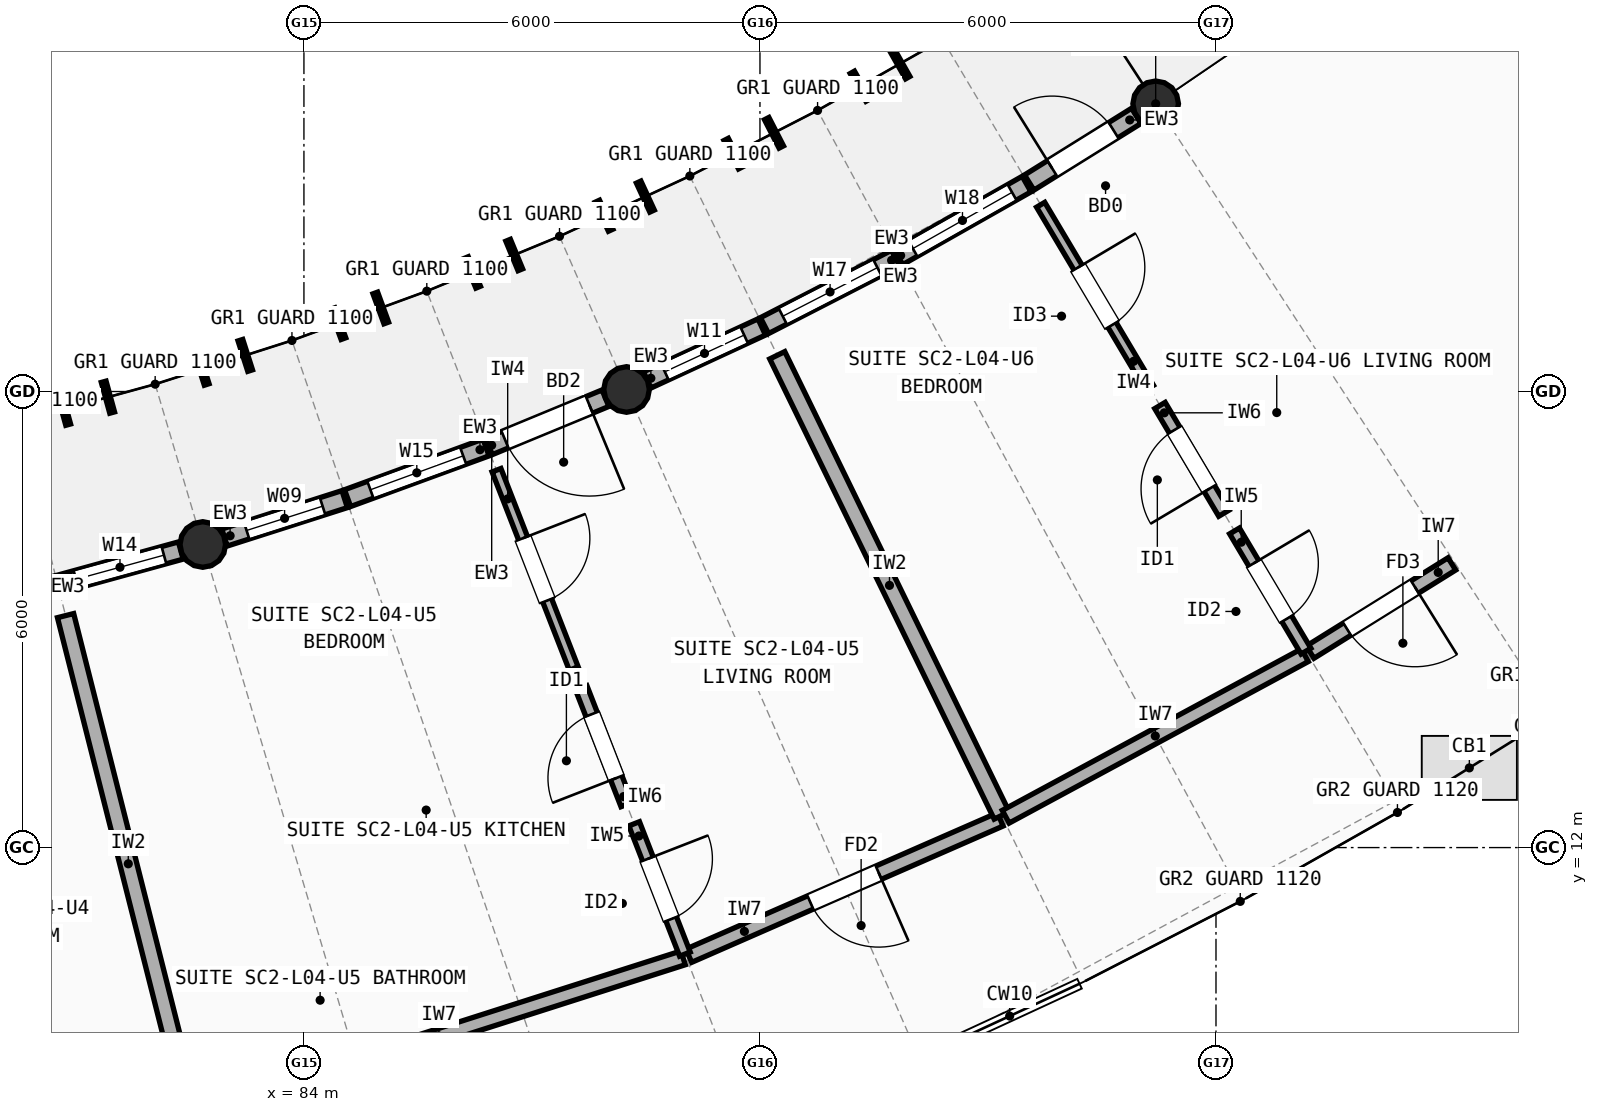
"""IFC4 building model, lengths in metres.
Left out: names, types, materials, properties, quantities, classifications, styles, units other than length and angle.
Written with IfcOpenShell. Run it as: python <this file> out.ifc"""

import sys

from ifc_helpers import new_model, si_unit, direction, frame, frame_2d, origin, origin_2d, place, context, subcontext, project, spatial, rectangle, circle, extrude, element, fill, save


model = new_model("IFC4")
c1 = context("Model", 3, precision=1e-05, world=origin(), true_north=direction((0.0, 1.0)))
c2 = subcontext(c1, "Body", "Model", "MODEL_VIEW")
j1 = project(units=[si_unit("LENGTHUNIT", "METRE"), si_unit("PLANEANGLEUNIT", "RADIAN")], contexts=[c1])
p1 = place(None, origin())
s1 = spatial("IfcSite", under=j1, at=p1, CompositionType="ELEMENT")
p2 = place(p1, origin())
s2 = spatial("IfcBuilding", under=s1, at=p2, CompositionType="ELEMENT")
p3 = place(p2, frame((0.0, 0.0, 14.1)))
s3 = spatial("IfcBuildingStorey", under=s2, at=p3, CompositionType="ELEMENT", Elevation=14.1)
for number, where, z_axis, x_axis in (
    (1, (82.669, 15.988, 0.0), (0.0, 0.0, 1.0), (1.0, 0.0, 0.0)),
    (2, (88.245, 18.027, 0.0), (0.0, 0.0, 1.0), (1.0, 0.0, 0.0)),
    (3, (95.207, 21.785, 0.0), (0.0, 0.0, 1.0), (1.0, 0.0, 0.0)),
):
    element("IfcColumn", number, at=place(p3, frame(where, z_axis=z_axis, x_axis=x_axis)), inside=s3, PredefinedType="COLUMN", context=c2, shape_type="SweptSolid", body=[
        extrude(circle(Radius=0.3, at=origin_2d()), origin(), (0.0, 0.0, 1.0), 2.948),
    ])
p4 = place(p3, frame((78.85, 15.022, 0.0), z_axis=(0.0, 0.0, 1.0), x_axis=(0.974359373104, 0.224997360081, 0.0)))
e4 = element("IfcWall", 4, at=p4, inside=s3, PredefinedType="STANDARD", context=c2, shape_type="SweptSolid", body=[
    extrude(rectangle(XDim=1.94, YDim=0.235, at=frame_2d((0.97, 0.0))), origin(), (0.0, 0.0, 1.0), 2.684),
])
p5 = place(p4, frame((0.42, 0.0, 0.0)))
e5 = element("IfcOpeningElement", 5, at=p5, cuts=e4, PredefinedType="OPENING", context=c2, shape_type="SweptSolid", body=[
    extrude(rectangle(XDim=1.1, YDim=2.15, at=frame_2d((0.55, 1.075))), frame((0.0, 0.127, 0.0), z_axis=(0.0, -1.0, 0.0), x_axis=(1.0, 0.0, 0.0)), (0.0, 0.0, 1.0), 0.255),
])
p6 = place(p3, frame((80.779, 15.468, 0.0), z_axis=(0.0, 0.0, 1.0), x_axis=(0.964276805489, 0.264896663619, 0.0)))
e6 = element("IfcWall", 6, at=p6, inside=s3, PredefinedType="STANDARD", context=c2, shape_type="SweptSolid", body=[
    extrude(rectangle(XDim=1.66, YDim=0.235, at=frame_2d((0.83, 0.0))), origin(), (0.0, 0.0, 1.0), 2.684),
])
p7 = place(p6, frame((0.23, 0.0, 0.85)))
e7 = element("IfcOpeningElement", 7, at=p7, cuts=e6, PredefinedType="OPENING", context=c2, shape_type="SweptSolid", body=[
    extrude(rectangle(XDim=1.2, YDim=1.5, at=frame_2d((0.6, 0.75))), frame((0.0, 0.127, 0.0), z_axis=(0.0, -1.0, 0.0), x_axis=(1.0, 0.0, 0.0)), (0.0, 0.0, 1.0), 0.255),
])
p8 = place(p3, frame((82.955, 16.079, 0.0), z_axis=(0.0, 0.0, 1.0), x_axis=(0.952523149859, 0.304466170508, 0.0)))
e8 = element("IfcWall", 8, at=p8, inside=s3, PredefinedType="STANDARD", context=c2, shape_type="SweptSolid", body=[
    extrude(rectangle(XDim=1.66, YDim=0.235, at=frame_2d((0.83, 0.0))), origin(), (0.0, 0.0, 1.0), 2.684),
])
p9 = place(p8, frame((0.305, 0.0, 0.85)))
e9 = element("IfcOpeningElement", 9, at=p9, cuts=e8, PredefinedType="OPENING", context=c2, shape_type="SweptSolid", body=[
    extrude(rectangle(XDim=1.05, YDim=1.35, at=frame_2d((0.525, 0.675))), frame((0.0, 0.127, 0.0), z_axis=(0.0, -1.0, 0.0), x_axis=(1.0, 0.0, 0.0)), (0.0, 0.0, 1.0), 0.255),
])
p10 = place(p3, frame((84.574, 16.597, 0.0), z_axis=(0.0, 0.0, 1.0), x_axis=(0.939178301307, 0.343429932235, 0.0)))
e10 = element("IfcWall", 10, at=p10, inside=s3, PredefinedType="STANDARD", context=c2, shape_type="SweptSolid", body=[
    extrude(rectangle(XDim=1.94, YDim=0.235, at=frame_2d((0.97, 0.0))), origin(), (0.0, 0.0, 1.0), 2.684),
])
p11 = place(p10, frame((0.32, 0.0, 0.85)))
e11 = element("IfcOpeningElement", 11, at=p11, cuts=e10, PredefinedType="OPENING", context=c2, shape_type="SweptSolid", body=[
    extrude(rectangle(XDim=1.3, YDim=1.45, at=frame_2d((0.65, 0.725))), frame((0.0, 0.127, 0.0), z_axis=(0.0, -1.0, 0.0), x_axis=(1.0, 0.0, 0.0)), (0.0, 0.0, 1.0), 0.255),
])
p12 = place(p3, frame((86.433, 17.278, 0.0), z_axis=(0.0, 0.0, 1.0), x_axis=(0.924165494985, 0.38199232699, 0.0)))
e12 = element("IfcWall", 12, at=p12, inside=s3, PredefinedType="STANDARD", context=c2, shape_type="SweptSolid", body=[
    extrude(rectangle(XDim=1.66, YDim=0.235, at=frame_2d((0.83, 0.0))), origin(), (0.0, 0.0, 1.0), 2.684),
])
p13 = place(p12, frame((0.23, 0.0, 0.0)))
e13 = element("IfcOpeningElement", 13, at=p13, cuts=e12, PredefinedType="OPENING", context=c2, shape_type="SweptSolid", body=[
    extrude(rectangle(XDim=1.2, YDim=2.15, at=frame_2d((0.6, 1.075))), frame((0.0, 0.127, 0.0), z_axis=(0.0, -1.0, 0.0), x_axis=(1.0, 0.0, 0.0)), (0.0, 0.0, 1.0), 0.255),
])
p14 = place(p3, frame((88.517, 18.153, 0.0), z_axis=(0.0, 0.0, 1.0), x_axis=(0.907575902742, 0.419888057418, 0.0)))
e14 = element("IfcWall", 14, at=p14, inside=s3, PredefinedType="STANDARD", context=c2, shape_type="SweptSolid", body=[
    extrude(rectangle(XDim=1.66, YDim=0.235, at=frame_2d((0.83, 0.0))), origin(), (0.0, 0.0, 1.0), 2.684),
])
p15 = place(p14, frame((0.255, 0.0, 0.85)))
e15 = element("IfcOpeningElement", 15, at=p15, cuts=e14, PredefinedType="OPENING", context=c2, shape_type="SweptSolid", body=[
    extrude(rectangle(XDim=1.15, YDim=1.45, at=frame_2d((0.575, 0.725))), frame((0.0, 0.127, 0.0), z_axis=(0.0, -1.0, 0.0), x_axis=(1.0, 0.0, 0.0)), (0.0, 0.0, 1.0), 0.255),
])
p16 = place(p3, frame((90.06, 18.867, 0.0), z_axis=(0.0, 0.0, 1.0), x_axis=(0.889517261343, 0.456901566832, 0.0)))
e16 = element("IfcWall", 16, at=p16, inside=s3, PredefinedType="STANDARD", context=c2, shape_type="SweptSolid", body=[
    extrude(rectangle(XDim=1.94, YDim=0.235, at=frame_2d((0.97, 0.0))), origin(), (0.0, 0.0, 1.0), 2.684),
])
p17 = place(p16, frame((0.27, 0.0, 0.85)))
e17 = element("IfcOpeningElement", 17, at=p17, cuts=e16, PredefinedType="OPENING", context=c2, shape_type="SweptSolid", body=[
    extrude(rectangle(XDim=1.4, YDim=1.5, at=frame_2d((0.7, 0.75))), frame((0.0, 0.127, 0.0), z_axis=(0.0, -1.0, 0.0), x_axis=(1.0, 0.0, 0.0)), (0.0, 0.0, 1.0), 0.255),
])
p18 = place(p3, frame((91.821, 19.772, 0.0), z_axis=(0.0, 0.0, 1.0), x_axis=(0.86993400964, 0.493168144623, 0.0)))
e18 = element("IfcWall", 18, at=p18, inside=s3, PredefinedType="STANDARD", context=c2, shape_type="SweptSolid", body=[
    extrude(rectangle(XDim=1.94, YDim=0.235, at=frame_2d((0.97, 0.0))), origin(), (0.0, 0.0, 1.0), 2.684),
])
p19 = place(p18, frame((0.22, 0.0, 0.85)))
e19 = element("IfcOpeningElement", 19, at=p19, cuts=e18, PredefinedType="OPENING", context=c2, shape_type="SweptSolid", body=[
    extrude(rectangle(XDim=1.5, YDim=1.4, at=frame_2d((0.75, 0.7))), frame((0.0, 0.127, 0.0), z_axis=(0.0, -1.0, 0.0), x_axis=(1.0, 0.0, 0.0)), (0.0, 0.0, 1.0), 0.255),
])
p20 = place(p3, frame((93.543, 20.75, 0.0), z_axis=(0.0, 0.0, 1.0), x_axis=(0.848955427013, 0.528464457598, 0.0)))
e20 = element("IfcWall", 20, at=p20, inside=s3, PredefinedType="STANDARD", context=c2, shape_type="SweptSolid", body=[
    extrude(rectangle(XDim=1.66, YDim=0.235, at=frame_2d((0.83, 0.0))), origin(), (0.0, 0.0, 1.0), 2.684),
])
p21 = place(p20, frame((0.355, 0.0, 0.0)))
e21 = element("IfcOpeningElement", 21, at=p21, cuts=e20, PredefinedType="OPENING", context=c2, shape_type="SweptSolid", body=[
    extrude(rectangle(XDim=0.95, YDim=2.12, at=frame_2d((0.475, 1.06))), frame((0.0, 0.127, 0.0), z_axis=(0.0, -1.0, 0.0), x_axis=(1.0, 0.0, 0.0)), (0.0, 0.0, 1.0), 0.255),
])
p22 = place(p3, frame((80.864, 15.052, 0.0), z_axis=(0.0, 0.0, 1.0), x_axis=(0.244982481903, -0.969527505314, 0.0)))
e22 = element("IfcWall", 22, at=p22, inside=s3, PredefinedType="SOLIDWALL", context=c2, shape_type="SweptSolid", body=[
    extrude(rectangle(XDim=6.736, YDim=0.22, at=frame_2d((3.368, 0.0))), origin(), (0.0, 0.0, 1.0), 2.762),
])
p23 = place(p3, frame((82.562, 8.495, 0.0), z_axis=(0.0, 0.0, 1.0), x_axis=(0.952529122406, 0.304447484746, 0.0)))
e23 = element("IfcWall", 23, at=p23, inside=s3, PredefinedType="SOLIDWALL", context=c2, shape_type="SweptSolid", body=[
    extrude(rectangle(XDim=6.747, YDim=0.19, at=frame_2d((3.374, 0.0))), origin(), (0.0, 0.0, 1.0), 2.722),
])
p24 = place(p3, frame((89.064, 10.577, 0.0), z_axis=(0.0, 0.0, 1.0), x_axis=(0.91610596958, 0.40093621999, 0.0)))
e24 = element("IfcWall", 24, at=p24, inside=s3, PredefinedType="SOLIDWALL", context=c2, shape_type="SweptSolid", body=[
    extrude(rectangle(XDim=4.473, YDim=0.19, at=frame_2d((2.237, 0.0))), origin(), (0.0, 0.0, 1.0), 2.722),
])
p25 = place(p24, frame((1.747, 0.0, 0.0)))
e25 = element("IfcOpeningElement", 25, at=p25, cuts=e24, PredefinedType="OPENING", context=c2, shape_type="SweptSolid", body=[
    extrude(rectangle(XDim=0.98, YDim=2.15, at=frame_2d((0.49, 1.075))), frame((0.0, 0.105, 0.0), z_axis=(0.0, -1.0, 0.0), x_axis=(1.0, 0.0, 0.0)), (0.0, 0.0, 1.0), 0.21),
])
p26 = place(p3, frame((86.534, 16.965, 0.0), z_axis=(0.0, 0.0, 1.0), x_axis=(0.362896442288, -0.93182947591, 0.0)))
e26 = element("IfcWall", 26, at=p26, inside=s3, PredefinedType="PARTITIONING", context=c2, shape_type="SweptSolid", body=[
    extrude(rectangle(XDim=2.8, YDim=0.125, at=frame_2d((1.4, 0.0))), origin(), (0.0, 0.0, 1.0), 2.762),
])
p27 = place(p26, frame((0.96, 0.0, 0.0)))
e27 = element("IfcOpeningElement", 27, at=p27, cuts=e26, PredefinedType="OPENING", context=c2, shape_type="SweptSolid", body=[
    extrude(rectangle(XDim=0.88, YDim=2.1, at=frame_2d((0.44, 1.05))), frame((0.0, 0.073, 0.0), z_axis=(0.0, -1.0, 0.0), x_axis=(1.0, 0.0, 0.0)), (0.0, 0.0, 1.0), 0.145),
])
p28 = place(p3, frame((87.648, 14.102, 0.0), z_axis=(0.0, 0.0, 1.0), x_axis=(0.362817996081, -0.9318600226, 0.0)))
e28 = element("IfcWall", 28, at=p28, inside=s3, PredefinedType="PLUMBINGWALL", context=c2, shape_type="SweptSolid", body=[
    extrude(rectangle(XDim=1.648, YDim=0.16, at=frame_2d((0.824, 0.0))), origin(), (0.0, 0.0, 1.0), 2.762),
])
p29 = place(p28, frame((0.374, 0.0, 0.0)))
e29 = element("IfcOpeningElement", 29, at=p29, cuts=e28, PredefinedType="OPENING", context=c2, shape_type="SweptSolid", body=[
    extrude(rectangle(XDim=0.9, YDim=2.1, at=frame_2d((0.45, 1.05))), frame((0.0, 0.09, 0.0), z_axis=(0.0, -1.0, 0.0), x_axis=(1.0, 0.0, 0.0)), (0.0, 0.0, 1.0), 0.18),
])
p30 = place(p3, frame((88.345, 12.313, 0.0), z_axis=(0.0, 0.0, 1.0), x_axis=(0.362772804225, -0.931877616705, 0.0)))
e30 = element("IfcWall", 30, at=p30, inside=s3, PredefinedType="PARTITIONING", context=c2, shape_type="SweptSolid", body=[
    extrude(rectangle(XDim=1.84, YDim=0.15, at=frame_2d((0.92, 0.0))), origin(), (0.0, 0.0, 1.0), 2.762),
])
p31 = place(p30, frame((0.495, 0.0, 0.0)))
e31 = element("IfcOpeningElement", 31, at=p31, cuts=e30, PredefinedType="OPENING", context=c2, shape_type="SweptSolid", body=[
    extrude(rectangle(XDim=0.85, YDim=2.1, at=frame_2d((0.425, 1.05))), frame((0.0, 0.085, 0.0), z_axis=(0.0, -1.0, 0.0), x_axis=(1.0, 0.0, 0.0)), (0.0, 0.0, 1.0), 0.17),
])
p32 = place(p3, frame((90.228, 18.477, 0.0), z_axis=(0.0, 0.0, 1.0), x_axis=(0.438406494017, -0.898776805444, 0.0)))
e32 = element("IfcWall", 32, at=p32, inside=s3, PredefinedType="SOLIDWALL", context=c2, shape_type="SweptSolid", body=[
    extrude(rectangle(XDim=6.736, YDim=0.22, at=frame_2d((3.368, 0.0))), origin(), (0.0, 0.0, 1.0), 2.742),
])
p33 = place(p3, frame((93.233, 12.406, 0.0), z_axis=(0.0, 0.0, 1.0), x_axis=(0.879935975281, 0.475092285147, 0.0)))
e33 = element("IfcWall", 33, at=p33, inside=s3, PredefinedType="SOLIDWALL", context=c2, shape_type="SweptSolid", body=[
    extrude(rectangle(XDim=4.473, YDim=0.19, at=frame_2d((2.236, 0.0))), origin(), (0.0, 0.0, 1.0), 2.762),
])
p34 = place(p3, frame((97.239, 14.571, 0.0), z_axis=(0.0, 0.0, 1.0), x_axis=(0.848914783767, 0.528529743631, 0.0)))
e34 = element("IfcWall", 34, at=p34, inside=s3, PredefinedType="SOLIDWALL", context=c2, shape_type="SweptSolid", body=[
    extrude(rectangle(XDim=2.197, YDim=0.19, at=frame_2d((1.099, 0.0))), origin(), (0.0, 0.0, 1.0), 2.95),
])
p35 = place(p34, frame((0.573, 0.0, 0.0)))
e35 = element("IfcOpeningElement", 35, at=p35, cuts=e34, PredefinedType="OPENING", context=c2, shape_type="SweptSolid", body=[
    extrude(rectangle(XDim=1.05, YDim=2.15, at=frame_2d((0.525, 1.075))), frame((0.0, 0.105, 0.0), z_axis=(0.0, -1.0, 0.0), x_axis=(1.0, 0.0, 0.0)), (0.0, 0.0, 1.0), 0.21),
])
p36 = place(p3, frame((93.693, 20.457, 0.0), z_axis=(0.0, 0.0, 1.0), x_axis=(0.510939588664, -0.859616621952, 0.0)))
e36 = element("IfcWall", 36, at=p36, inside=s3, PredefinedType="PARTITIONING", context=c2, shape_type="SweptSolid", body=[
    extrude(rectangle(XDim=2.8, YDim=0.125, at=frame_2d((1.4, 0.0))), origin(), (0.0, 0.0, 1.0), 2.722),
])
p37 = place(p36, frame((0.96, 0.0, 0.0)))
e37 = element("IfcOpeningElement", 37, at=p37, cuts=e36, PredefinedType="OPENING", context=c2, shape_type="SweptSolid", body=[
    extrude(rectangle(XDim=0.88, YDim=2.1, at=frame_2d((0.44, 1.05))), frame((0.0, 0.073, 0.0), z_axis=(0.0, -1.0, 0.0), x_axis=(1.0, 0.0, 0.0)), (0.0, 0.0, 1.0), 0.145),
])
p38 = place(p3, frame((95.263, 17.816, 0.0), z_axis=(0.0, 0.0, 1.0), x_axis=(0.510918615189, -0.859629087835, 0.0)))
e38 = element("IfcWall", 38, at=p38, inside=s3, PredefinedType="PLUMBINGWALL", context=c2, shape_type="SweptSolid", body=[
    extrude(rectangle(XDim=1.648, YDim=0.16, at=frame_2d((0.824, 0.0))), origin(), (0.0, 0.0, 1.0), 2.722),
])
p39 = place(p38, frame((0.374, 0.0, 0.0)))
e39 = element("IfcOpeningElement", 39, at=p39, cuts=e38, PredefinedType="OPENING", context=c2, shape_type="SweptSolid", body=[
    extrude(rectangle(XDim=0.9, YDim=2.1, at=frame_2d((0.45, 1.05))), frame((0.0, 0.09, 0.0), z_axis=(0.0, -1.0, 0.0), x_axis=(1.0, 0.0, 0.0)), (0.0, 0.0, 1.0), 0.18),
])
p40 = place(p3, frame((96.244, 16.166, 0.0), z_axis=(0.0, 0.0, 1.0), x_axis=(0.510998553825, -0.859581571457, 0.0)))
e40 = element("IfcWall", 40, at=p40, inside=s3, PredefinedType="PARTITIONING", context=c2, shape_type="SweptSolid", body=[
    extrude(rectangle(XDim=1.84, YDim=0.15, at=frame_2d((0.92, 0.0))), origin(), (0.0, 0.0, 1.0), 2.722),
])
p41 = place(p40, frame((0.495, 0.0, 0.0)))
e41 = element("IfcOpeningElement", 41, at=p41, cuts=e40, PredefinedType="OPENING", context=c2, shape_type="SweptSolid", body=[
    extrude(rectangle(XDim=0.85, YDim=2.1, at=frame_2d((0.425, 1.05))), frame((0.0, 0.085, 0.0), z_axis=(0.0, -1.0, 0.0), x_axis=(1.0, 0.0, 0.0)), (0.0, 0.0, 1.0), 0.17),
])
p42 = place(p7, origin())
e42 = element("IfcWindow", 42, at=p42, inside=s3, PartitioningType="SINGLE_PANEL", PredefinedType="WINDOW", context=c2, shape_type="SweptSolid", body=[
    extrude(rectangle(XDim=1.2, YDim=1.5, at=frame_2d((0.6, 0.75))), frame((0.0, 0.03, 0.0), z_axis=(0.0, -1.0, 0.0), x_axis=(1.0, 0.0, 0.0)), (0.0, 0.0, 1.0), 0.06),
])
fill(e7, e42)
p43 = place(p9, origin())
e43 = element("IfcWindow", 43, at=p43, inside=s3, PartitioningType="SINGLE_PANEL", PredefinedType="WINDOW", context=c2, shape_type="SweptSolid", body=[
    extrude(rectangle(XDim=1.05, YDim=1.35, at=frame_2d((0.525, 0.675))), frame((0.0, 0.03, 0.0), z_axis=(0.0, -1.0, 0.0), x_axis=(1.0, 0.0, 0.0)), (0.0, 0.0, 1.0), 0.06),
])
fill(e9, e43)
p44 = place(p11, origin())
e44 = element("IfcWindow", 44, at=p44, inside=s3, PartitioningType="SINGLE_PANEL", PredefinedType="WINDOW", context=c2, shape_type="SweptSolid", body=[
    extrude(rectangle(XDim=1.3, YDim=1.45, at=frame_2d((0.65, 0.725))), frame((0.0, 0.03, 0.0), z_axis=(0.0, -1.0, 0.0), x_axis=(1.0, 0.0, 0.0)), (0.0, 0.0, 1.0), 0.06),
])
fill(e11, e44)
p45 = place(p13, origin())
e45 = element("IfcDoor", 45, at=p45, inside=s3, OperationType="SINGLE_SWING_RIGHT", PredefinedType="DOOR", context=c2, shape_type="SweptSolid", body=[
    extrude(rectangle(XDim=1.2, YDim=2.15, at=frame_2d((0.6, 1.075))), frame((0.0, 0.025, 0.0), z_axis=(0.0, -1.0, 0.0), x_axis=(1.0, 0.0, 0.0)), (0.0, 0.0, 1.0), 0.05),
])
fill(e13, e45)
p46 = place(p15, origin())
e46 = element("IfcWindow", 46, at=p46, inside=s3, PartitioningType="SINGLE_PANEL", PredefinedType="WINDOW", context=c2, shape_type="SweptSolid", body=[
    extrude(rectangle(XDim=1.15, YDim=1.45, at=frame_2d((0.575, 0.725))), frame((0.0, 0.03, 0.0), z_axis=(0.0, -1.0, 0.0), x_axis=(1.0, 0.0, 0.0)), (0.0, 0.0, 1.0), 0.06),
])
fill(e15, e46)
p47 = place(p17, origin())
e47 = element("IfcWindow", 47, at=p47, inside=s3, PartitioningType="SINGLE_PANEL", PredefinedType="WINDOW", context=c2, shape_type="SweptSolid", body=[
    extrude(rectangle(XDim=1.4, YDim=1.5, at=frame_2d((0.7, 0.75))), frame((0.0, 0.03, 0.0), z_axis=(0.0, -1.0, 0.0), x_axis=(1.0, 0.0, 0.0)), (0.0, 0.0, 1.0), 0.06),
])
fill(e17, e47)
p48 = place(p19, origin())
e48 = element("IfcWindow", 48, at=p48, inside=s3, PartitioningType="SINGLE_PANEL", PredefinedType="WINDOW", context=c2, shape_type="SweptSolid", body=[
    extrude(rectangle(XDim=1.5, YDim=1.4, at=frame_2d((0.75, 0.7))), frame((0.0, 0.03, 0.0), z_axis=(0.0, -1.0, 0.0), x_axis=(1.0, 0.0, 0.0)), (0.0, 0.0, 1.0), 0.06),
])
fill(e19, e48)
p49 = place(p21, origin())
e49 = element("IfcDoor", 49, at=p49, inside=s3, OperationType="SINGLE_SWING_LEFT", PredefinedType="DOOR", context=c2, shape_type="SweptSolid", body=[
    extrude(rectangle(XDim=0.95, YDim=2.12, at=frame_2d((0.475, 1.06))), frame((0.0, 0.025, 0.0), z_axis=(0.0, -1.0, 0.0), x_axis=(1.0, 0.0, 0.0)), (0.0, 0.0, 1.0), 0.05),
])
fill(e21, e49)
p50 = place(p25, origin())
e50 = element("IfcDoor", 50, at=p50, inside=s3, OperationType="SINGLE_SWING_RIGHT", PredefinedType="DOOR", context=c2, shape_type="SweptSolid", body=[
    extrude(rectangle(XDim=0.98, YDim=2.15, at=frame_2d((0.49, 1.075))), frame((0.0, 0.025, 0.0), z_axis=(0.0, -1.0, 0.0), x_axis=(1.0, 0.0, 0.0)), (0.0, 0.0, 1.0), 0.05),
])
fill(e25, e50)
p51 = place(p27, origin())
e51 = element("IfcDoor", 51, at=p51, inside=s3, OperationType="SINGLE_SWING_LEFT", PredefinedType="DOOR", context=c2, shape_type="SweptSolid", body=[
    extrude(rectangle(XDim=0.88, YDim=2.1, at=frame_2d((0.44, 1.05))), frame((0.0, 0.025, 0.0), z_axis=(0.0, -1.0, 0.0), x_axis=(1.0, 0.0, 0.0)), (0.0, 0.0, 1.0), 0.05),
])
fill(e27, e51)
p52 = place(p29, origin())
e52 = element("IfcDoor", 52, at=p52, inside=s3, OperationType="SINGLE_SWING_RIGHT", PredefinedType="DOOR", context=c2, shape_type="SweptSolid", body=[
    extrude(rectangle(XDim=0.9, YDim=2.1, at=frame_2d((0.45, 1.05))), frame((0.0, 0.025, 0.0), z_axis=(0.0, -1.0, 0.0), x_axis=(1.0, 0.0, 0.0)), (0.0, 0.0, 1.0), 0.05),
])
fill(e29, e52)
p53 = place(p31, origin())
e53 = element("IfcDoor", 53, at=p53, inside=s3, OperationType="SINGLE_SWING_LEFT", PredefinedType="DOOR", context=c2, shape_type="SweptSolid", body=[
    extrude(rectangle(XDim=0.85, YDim=2.1, at=frame_2d((0.425, 1.05))), frame((0.0, 0.025, 0.0), z_axis=(0.0, -1.0, 0.0), x_axis=(1.0, 0.0, 0.0)), (0.0, 0.0, 1.0), 0.05),
])
fill(e31, e53)
p54 = place(p35, origin())
e54 = element("IfcDoor", 54, at=p54, inside=s3, OperationType="SINGLE_SWING_RIGHT", PredefinedType="DOOR", context=c2, shape_type="SweptSolid", body=[
    extrude(rectangle(XDim=1.05, YDim=2.15, at=frame_2d((0.525, 1.075))), frame((0.0, 0.025, 0.0), z_axis=(0.0, -1.0, 0.0), x_axis=(1.0, 0.0, 0.0)), (0.0, 0.0, 1.0), 0.05),
])
fill(e35, e54)
p55 = place(p37, origin())
e55 = element("IfcDoor", 55, at=p55, inside=s3, OperationType="SINGLE_SWING_LEFT", PredefinedType="DOOR", context=c2, shape_type="SweptSolid", body=[
    extrude(rectangle(XDim=0.88, YDim=2.1, at=frame_2d((0.44, 1.05))), frame((0.0, 0.025, 0.0), z_axis=(0.0, -1.0, 0.0), x_axis=(1.0, 0.0, 0.0)), (0.0, 0.0, 1.0), 0.05),
])
fill(e37, e55)
p56 = place(p39, origin())
e56 = element("IfcDoor", 56, at=p56, inside=s3, OperationType="SINGLE_SWING_RIGHT", PredefinedType="DOOR", context=c2, shape_type="SweptSolid", body=[
    extrude(rectangle(XDim=0.9, YDim=2.1, at=frame_2d((0.45, 1.05))), frame((0.0, 0.025, 0.0), z_axis=(0.0, -1.0, 0.0), x_axis=(1.0, 0.0, 0.0)), (0.0, 0.0, 1.0), 0.05),
])
fill(e39, e56)
p57 = place(p41, origin())
e57 = element("IfcDoor", 57, at=p57, inside=s3, OperationType="SINGLE_SWING_LEFT", PredefinedType="DOOR", context=c2, shape_type="SweptSolid", body=[
    extrude(rectangle(XDim=0.85, YDim=2.1, at=frame_2d((0.425, 1.05))), frame((0.0, 0.025, 0.0), z_axis=(0.0, -1.0, 0.0), x_axis=(1.0, 0.0, 0.0)), (0.0, 0.0, 1.0), 0.05),
])
fill(e41, e57)
save(model, sys.argv[1])
